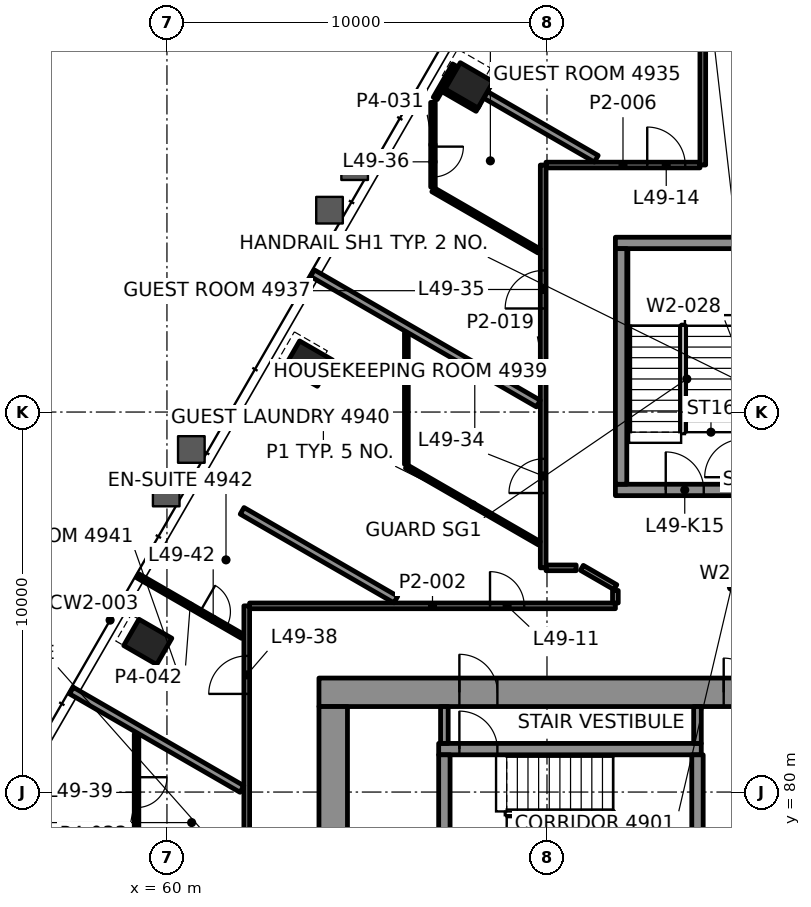
"""IFC4 building model, lengths in metres.
Left out: names, types, materials, properties, quantities, classifications, styles, units other than length and angle.
Written with IfcOpenShell. Run it as: python <this file> out.ifc"""

import sys

from ifc_helpers import new_model, si_unit, direction, frame, frame_2d, origin, origin_2d, place, context, subcontext, project, spatial, rectangle, hollow_rectangle, extrude, element, fill, save


model = new_model("IFC4")
c1 = context("Model", 3, precision=1e-05, world=origin(), true_north=direction((0.0, 1.0)))
c2 = subcontext(c1, "Body", "Model", "MODEL_VIEW")
j1 = project(units=[si_unit("LENGTHUNIT", "METRE"), si_unit("PLANEANGLEUNIT", "RADIAN")], contexts=[c1])
p1 = place(None, origin())
s1 = spatial("IfcSite", under=j1, at=p1, CompositionType="ELEMENT")
p2 = place(p1, origin())
s2 = spatial("IfcBuilding", under=s1, at=p2, CompositionType="ELEMENT")
p3 = place(p2, frame((0.0, 0.0, 210.4)))
s3 = spatial("IfcBuildingStorey", under=s2, at=p3, CompositionType="ELEMENT", Elevation=210.4)
for number, where, z_axis, x_axis in (
    (1, (67.952, 98.597, -0.0), (0.0, 0.0, 1.0), (-0.5, -0.866, 0.0)),
    (2, (63.724, 91.274, -0.0), (0.0, 0.0, 1.0), (-0.5, -0.866, 0.0)),
    (3, (59.496, 83.951, -0.0), (0.0, 0.0, 1.0), (-0.5, -0.866, 0.0)),
):
    element("IfcColumn", number, at=place(p3, frame(where, z_axis=z_axis, x_axis=x_axis)), inside=s3, PredefinedType="COLUMN", context=c2, shape_type="SweptSolid", body=[
        extrude(hollow_rectangle(XDim=0.8, YDim=1.0, WallThickness=0.05, at=origin_2d()), origin(), (0.0, 0.0, 1.0), 3.9),
    ])
p4 = place(p3, frame((64.0, 82.625, 0.0), z_axis=(0.0, 0.0, 1.0), x_axis=(1.0, 0.0, 0.0)))
e4 = element("IfcWall", 4, at=p4, inside=s3, PredefinedType="SHEAR", context=c2, shape_type="SweptSolid", body=[
    extrude(rectangle(XDim=22.0, YDim=0.75, at=frame_2d((11.0, 0.0))), origin(), (0.0, 0.0, 1.0), 3.7),
])
p5 = place(p4, frame((3.695, 0.0, 0.0)))
e5 = element("IfcOpeningElement", 5, at=p5, cuts=e4, PredefinedType="OPENING", context=c2, shape_type="SweptSolid", body=[
    extrude(rectangle(XDim=1.0, YDim=2.1, at=frame_2d((0.5, 1.05))), frame((0.0, 0.385, 0.0), z_axis=(0.0, -1.0, 0.0), x_axis=(1.0, 0.0, 0.0)), (0.0, 0.0, 1.0), 0.77),
])
p6 = place(p4, frame((17.505, 0.0, 0.0)))
e6 = element("IfcOpeningElement", 6, at=p6, cuts=e4, PredefinedType="OPENING", context=c2, shape_type="SweptSolid", body=[
    extrude(rectangle(XDim=1.0, YDim=2.1, at=frame_2d((0.5, 1.05))), frame((0.0, 0.385, 0.0), z_axis=(0.0, -1.0, 0.0), x_axis=(1.0, 0.0, 0.0)), (0.0, 0.0, 1.0), 0.77),
])
p7 = place(p4, frame((10.65, 0.0, 0.0)))
e7 = element("IfcOpeningElement", 7, at=p7, cuts=e4, PredefinedType="OPENING", context=c2, shape_type="SweptSolid", body=[
    extrude(rectangle(XDim=0.9, YDim=2.1, at=frame_2d((0.45, 1.05))), frame((0.0, 0.385, 0.0), z_axis=(0.0, -1.0, 0.0), x_axis=(1.0, 0.0, 0.0)), (0.0, 0.0, 1.0), 0.77),
])
p8 = place(p3, frame((64.375, 67.75, 0.0), z_axis=(0.0, 0.0, 1.0), x_axis=(0.0, 1.0, 0.0)))
e8 = element("IfcWall", 8, at=p8, inside=s3, PredefinedType="SHEAR", context=c2, shape_type="SweptSolid", body=[
    extrude(rectangle(XDim=14.5, YDim=0.75, at=frame_2d((7.25, 0.0))), origin(), (0.0, 0.0, 1.0), 3.7),
])
p9 = place(p8, frame((4.65, 0.0, 0.0)))
e9 = element("IfcOpeningElement", 9, at=p9, cuts=e8, PredefinedType="OPENING", context=c2, shape_type="SweptSolid", body=[
    extrude(rectangle(XDim=1.8, YDim=2.1, at=frame_2d((0.9, 1.05))), frame((0.0, 0.385, 0.0), z_axis=(0.0, -1.0, 0.0), x_axis=(1.0, 0.0, 0.0)), (0.0, 0.0, 1.0), 0.77),
])
p10 = place(p8, frame((2.55, 0.0, 0.0)))
e10 = element("IfcOpeningElement", 10, at=p10, cuts=e8, PredefinedType="OPENING", context=c2, shape_type="SweptSolid", body=[
    extrude(rectangle(XDim=0.9, YDim=2.1, at=frame_2d((0.45, 1.05))), frame((0.0, 0.385, 0.0), z_axis=(0.0, -1.0, 0.0), x_axis=(1.0, 0.0, 0.0)), (0.0, 0.0, 1.0), 0.77),
])
p11 = place(p8, frame((10.35, 0.0, 0.0)))
e11 = element("IfcOpeningElement", 11, at=p11, cuts=e8, PredefinedType="OPENING", context=c2, shape_type="SweptSolid", body=[
    extrude(rectangle(XDim=0.9, YDim=2.1, at=frame_2d((0.45, 1.05))), frame((0.0, 0.385, 0.0), z_axis=(0.0, -1.0, 0.0), x_axis=(1.0, 0.0, 0.0)), (0.0, 0.0, 1.0), 0.77),
])
p12 = place(p3, frame((67.15, 81.13, 0.0), z_axis=(0.0, 0.0, 1.0), x_axis=(1.0, 0.0, 0.0)))
e12 = element("IfcWall", 12, at=p12, inside=s3, PredefinedType="SHEAR", context=c2, shape_type="SweptSolid", body=[
    extrude(rectangle(XDim=6.91, YDim=0.3, at=frame_2d((3.455, 0.0))), origin(), (0.0, 0.0, 1.0), 3.7),
])
p13 = place(p12, frame((0.545, 0.0, 0.0)))
e13 = element("IfcOpeningElement", 13, at=p13, cuts=e12, PredefinedType="OPENING", context=c2, shape_type="SweptSolid", body=[
    extrude(rectangle(XDim=1.0, YDim=2.1, at=frame_2d((0.5, 1.05))), frame((0.0, 0.16, 0.0), z_axis=(0.0, -1.0, 0.0), x_axis=(1.0, 0.0, 0.0)), (0.0, 0.0, 1.0), 0.32),
])
for number, where, z_axis, x_axis in (
    (14, (67.3, 77.9, 0.0), (0.0, 0.0, 1.0), (0.0, 1.0, 0.0)),
    (15, (73.96, 77.9, 0.0), (0.0, 0.0, 1.0), (0.0, 1.0, 0.0)),
):
    element("IfcWall", number, at=place(p3, frame(where, z_axis=z_axis, x_axis=x_axis)), inside=s3, PredefinedType="SHEAR", context=c2, shape_type="SweptSolid", body=[
        extrude(rectangle(XDim=3.08, YDim=0.3, at=frame_2d((1.54, 0.0))), origin(), (0.0, 0.0, 1.0), 3.7),
    ])
p14 = place(p3, frame((71.8, 87.95, 0.0), z_axis=(0.0, 0.0, 1.0), x_axis=(1.0, 0.0, 0.0)))
e16 = element("IfcWall", 16, at=p14, inside=s3, PredefinedType="SHEAR", context=c2, shape_type="SweptSolid", body=[
    extrude(rectangle(XDim=6.4, YDim=0.3, at=frame_2d((3.2, 0.0))), origin(), (0.0, 0.0, 1.0), 3.7),
])
p15 = place(p14, frame((1.325, 0.0, 0.0)))
e17 = element("IfcOpeningElement", 17, at=p15, cuts=e16, PredefinedType="OPENING", context=c2, shape_type="SweptSolid", body=[
    extrude(rectangle(XDim=1.0, YDim=2.1, at=frame_2d((0.5, 1.05))), frame((0.0, 0.16, 0.0), z_axis=(0.0, -1.0, 0.0), x_axis=(1.0, 0.0, 0.0)), (0.0, 0.0, 1.0), 0.32),
])
p16 = place(p14, frame((4.125, 0.0, 0.0)))
e18 = element("IfcOpeningElement", 18, at=p16, cuts=e16, PredefinedType="OPENING", context=c2, shape_type="SweptSolid", body=[
    extrude(rectangle(XDim=1.2, YDim=2.1, at=frame_2d((0.6, 1.05))), frame((0.0, 0.16, 0.0), z_axis=(0.0, -1.0, 0.0), x_axis=(1.0, 0.0, 0.0)), (0.0, 0.0, 1.0), 0.32),
])
p17 = place(p3, frame((71.8, 94.45, 0.0), z_axis=(0.0, 0.0, 1.0), x_axis=(1.0, 0.0, 0.0)))
e19 = element("IfcWall", 19, at=p17, inside=s3, PredefinedType="SHEAR", context=c2, shape_type="SweptSolid", body=[
    extrude(rectangle(XDim=6.4, YDim=0.3, at=frame_2d((3.2, 0.0))), origin(), (0.0, 0.0, 1.0), 3.7),
])
p18 = place(p3, frame((71.95, 88.1, 0.0), z_axis=(0.0, 0.0, 1.0), x_axis=(0.0, 1.0, 0.0)))
e20 = element("IfcWall", 20, at=p18, inside=s3, PredefinedType="SHEAR", context=c2, shape_type="SweptSolid", body=[
    extrude(rectangle(XDim=6.2, YDim=0.3, at=frame_2d((3.1, 0.0))), origin(), (0.0, 0.0, 1.0), 3.7),
])
p19 = place(p3, frame((62.175, 84.9, 0.0), z_axis=(0.0, 0.0, 1.0), x_axis=(1.0, 0.0, 0.0)))
e21 = element("IfcWall", 21, at=p19, inside=s3, PredefinedType="PARTITIONING", context=c2, shape_type="SweptSolid", body=[
    extrude(rectangle(XDim=9.625, YDim=0.15, at=frame_2d((4.812, 0.0))), origin(), (0.0, 0.0, 1.0), 3.097),
])
p20 = place(p19, frame((6.326, 0.0, 0.0)))
e22 = element("IfcOpeningElement", 22, at=p20, cuts=e21, PredefinedType="OPENING", context=c2, shape_type="SweptSolid", body=[
    extrude(rectangle(XDim=0.9, YDim=2.1, at=frame_2d((0.45, 1.05))), frame((0.0, 0.085, 0.0), z_axis=(0.0, -1.0, 0.0), x_axis=(1.0, 0.0, 0.0)), (0.0, 0.0, 1.0), 0.17),
])
p21 = place(p3, frame((69.976, 85.9, 0.0), z_axis=(0.0, 0.0, 1.0), x_axis=(1.0, 0.0, 0.0)))
e23 = element("IfcWall", 23, at=p21, inside=s3, PredefinedType="PARTITIONING", context=c2, shape_type="SweptSolid", body=[
    extrude(rectangle(XDim=0.792, YDim=0.15, at=frame_2d((0.396, 0.0))), origin(), (0.0, 0.0, 1.0), 3.097),
])
p22 = place(p3, frame((69.975, 96.5, 0.0), z_axis=(0.0, 0.0, 1.0), x_axis=(1.0, 0.0, 0.0)))
e24 = element("IfcWall", 24, at=p22, inside=s3, PredefinedType="PARTITIONING", context=c2, shape_type="SweptSolid", body=[
    extrude(rectangle(XDim=4.05, YDim=0.15, at=frame_2d((2.025, 0.0))), origin(), (0.0, 0.0, 1.0), 3.1),
])
p23 = place(p22, frame((2.663, 0.0, 0.0)))
e25 = element("IfcOpeningElement", 25, at=p23, cuts=e24, PredefinedType="OPENING", context=c2, shape_type="SweptSolid", body=[
    extrude(rectangle(XDim=1.0, YDim=2.1, at=frame_2d((0.5, 1.05))), frame((0.0, 0.085, 0.0), z_axis=(0.0, -1.0, 0.0), x_axis=(1.0, 0.0, 0.0)), (0.0, 0.0, 1.0), 0.17),
])
p24 = place(p3, frame((67.06, 98.253, 0.0), z_axis=(0.0, 0.0, 1.0), x_axis=(0.499972622635, 0.866041209536, 0.0)))
e26 = element("IfcWall", 26, at=p24, inside=s3, PredefinedType="PARTITIONING", context=c2, shape_type="SweptSolid", body=[
    extrude(rectangle(XDim=1.014, YDim=0.12, at=frame_2d((0.507, 0.0))), origin(), (0.0, 0.0, 1.0), 3.1),
])
p25 = place(p3, frame((74.1, 96.5, 0.0), z_axis=(0.0, 0.0, 1.0), x_axis=(0.0, 1.0, 0.0)))
e27 = element("IfcWall", 27, at=p25, inside=s3, PredefinedType="PARTITIONING", context=c2, shape_type="SweptSolid", body=[
    extrude(rectangle(XDim=6.67, YDim=0.15, at=frame_2d((3.335, 0.0))), origin(), (0.0, 0.0, 1.0), 3.1),
])
p26 = place(p3, frame((71.8, 84.975, 0.0), z_axis=(0.0, 0.0, 1.0), x_axis=(0.0, 1.0, 0.0)))
e28 = element("IfcWall", 28, at=p26, inside=s3, PredefinedType="PARTITIONING", context=c2, shape_type="SweptSolid", body=[
    extrude(rectangle(XDim=0.329, YDim=0.15, at=frame_2d((0.165, 0.0))), origin(), (0.0, 0.0, 1.0), 3.1),
])
p27 = place(p3, frame((69.9, 85.9, 0.0), z_axis=(0.0, 0.0, 1.0), x_axis=(0.0, 1.0, 0.0)))
e29 = element("IfcWall", 29, at=p27, inside=s3, PredefinedType="PARTITIONING", context=c2, shape_type="SweptSolid", body=[
    extrude(rectangle(XDim=10.6, YDim=0.15, at=frame_2d((5.3, 0.0))), origin(), (0.0, 0.0, 1.0), 3.097),
])
p28 = place(p27, frame((1.968, 0.0, 0.0)))
e30 = element("IfcOpeningElement", 30, at=p28, cuts=e29, PredefinedType="OPENING", context=c2, shape_type="SweptSolid", body=[
    extrude(rectangle(XDim=0.9, YDim=2.1, at=frame_2d((0.45, 1.05))), frame((0.0, 0.085, 0.0), z_axis=(0.0, -1.0, 0.0), x_axis=(1.0, 0.0, 0.0)), (0.0, 0.0, 1.0), 0.17),
])
p29 = place(p27, frame((6.825, 0.0, 0.0)))
e31 = element("IfcOpeningElement", 31, at=p29, cuts=e29, PredefinedType="OPENING", context=c2, shape_type="SweptSolid", body=[
    extrude(rectangle(XDim=1.0, YDim=2.1, at=frame_2d((0.5, 1.05))), frame((0.0, 0.085, 0.0), z_axis=(0.0, -1.0, 0.0), x_axis=(1.0, 0.0, 0.0)), (0.0, 0.0, 1.0), 0.17),
])
p30 = place(p3, frame((67.0, 98.149, 0.0), z_axis=(0.0, 0.0, 1.0), x_axis=(0.0, -1.0, 0.0)))
e32 = element("IfcWall", 32, at=p30, inside=s3, PredefinedType="PARTITIONING", context=c2, shape_type="SweptSolid", body=[
    extrude(rectangle(XDim=2.228, YDim=0.12, at=frame_2d((1.114, 0.0))), origin(), (0.0, 0.0, 1.0), 3.022),
])
p31 = place(p30, frame((1.164, 0.0, 0.0)))
e33 = element("IfcOpeningElement", 33, at=p31, cuts=e32, PredefinedType="OPENING", context=c2, shape_type="SweptSolid", body=[
    extrude(rectangle(XDim=0.8, YDim=2.1, at=frame_2d((0.4, 1.05))), frame((0.0, 0.07, 0.0), z_axis=(0.0, -1.0, 0.0), x_axis=(1.0, 0.0, 0.0)), (0.0, 0.0, 1.0), 0.14),
])
p32 = place(p3, frame((66.3, 88.624, 0.0), z_axis=(0.0, 0.0, 1.0), x_axis=(0.0, 1.0, 0.0)))
e34 = element("IfcWall", 34, at=p32, inside=s3, PredefinedType="PARTITIONING", context=c2, shape_type="SweptSolid", body=[
    extrude(rectangle(XDim=3.458, YDim=0.1, at=frame_2d((1.729, 0.0))), origin(), (0.0, 0.0, 1.0), 3.1),
])
p33 = place(p3, frame((62.1, 68.591, 0.0), z_axis=(0.0, 0.0, 1.0), x_axis=(0.0, 1.0, 0.0)))
e35 = element("IfcWall", 35, at=p33, inside=s3, PredefinedType="PARTITIONING", context=c2, shape_type="SweptSolid", body=[
    extrude(rectangle(XDim=16.309, YDim=0.15, at=frame_2d((8.154, 0.0))), origin(), (0.0, 0.0, 1.0), 3.1),
])
p34 = place(p33, frame((6.668, 0.0, 0.0)))
e36 = element("IfcOpeningElement", 36, at=p34, cuts=e35, PredefinedType="OPENING", context=c2, shape_type="SweptSolid", body=[
    extrude(rectangle(XDim=1.0, YDim=2.1, at=frame_2d((0.5, 1.05))), frame((0.0, 0.085, 0.0), z_axis=(0.0, -1.0, 0.0), x_axis=(1.0, 0.0, 0.0)), (0.0, 0.0, 1.0), 0.17),
])
p35 = place(p33, frame((13.991, 0.0, 0.0)))
e37 = element("IfcOpeningElement", 37, at=p35, cuts=e35, PredefinedType="OPENING", context=c2, shape_type="SweptSolid", body=[
    extrude(rectangle(XDim=1.0, YDim=2.1, at=frame_2d((0.5, 1.05))), frame((0.0, 0.085, 0.0), z_axis=(0.0, -1.0, 0.0), x_axis=(1.0, 0.0, 0.0)), (0.0, 0.0, 1.0), 0.17),
])
p36 = place(p3, frame((59.2, 81.526, 0.0), z_axis=(0.0, 0.0, 1.0), x_axis=(0.0, -1.0, 0.0)))
e38 = element("IfcWall", 38, at=p36, inside=s3, PredefinedType="PARTITIONING", context=c2, shape_type="SweptSolid", body=[
    extrude(rectangle(XDim=3.07, YDim=0.12, at=frame_2d((1.535, 0.0))), origin(), (0.0, 0.0, 1.0), 3.1),
])
p37 = place(p36, frame((1.135, 0.0, 0.0)))
e39 = element("IfcOpeningElement", 39, at=p37, cuts=e38, PredefinedType="OPENING", context=c2, shape_type="SweptSolid", body=[
    extrude(rectangle(XDim=0.8, YDim=2.1, at=frame_2d((0.4, 1.05))), frame((0.0, 0.07, 0.0), z_axis=(0.0, -1.0, 0.0), x_axis=(1.0, 0.0, 0.0)), (0.0, 0.0, 1.0), 0.14),
])
p38 = place(p3, frame((71.298, 96.665, 0.0), z_axis=(0.0, 0.0, 1.0), x_axis=(-0.866023625329, 0.500003080363, 0.0)))
e40 = element("IfcWall", 40, at=p38, inside=s3, PredefinedType="PARTITIONING", context=c2, shape_type="SweptSolid", body=[
    extrude(rectangle(XDim=3.364, YDim=0.2, at=frame_2d((1.682, 0.0))), origin(), (0.0, 0.0, 1.0), 3.1),
])
p39 = place(p3, frame((68.185, 98.0, 0.0), z_axis=(0.0, 0.0, 1.0), x_axis=(-0.866071776036, 0.499919672301, 0.0)))
e41 = element("IfcWall", 41, at=p39, inside=s3, PredefinedType="PARTITIONING", context=c2, shape_type="SweptSolid", body=[
    extrude(rectangle(XDim=1.0, YDim=0.2, at=frame_2d((0.5, 0.0))), origin(), (0.0, 0.0, 1.0), 3.022),
])
p40 = place(p3, frame((69.79, 94.24, 0.0), z_axis=(0.0, 0.0, 1.0), x_axis=(-0.86604299788, 0.499969524894, 0.0)))
e42 = element("IfcWall", 42, at=p40, inside=s3, PredefinedType="PARTITIONING", context=c2, shape_type="SweptSolid", body=[
    extrude(rectangle(XDim=3.222, YDim=0.12, at=frame_2d((1.611, 0.0))), origin(), (0.0, 0.0, 1.0), 3.1),
])
p41 = place(p3, frame((69.773, 90.222, 0.0), z_axis=(0.0, 0.0, 1.0), x_axis=(-0.866032781393, 0.499987221389, 0.0)))
e43 = element("IfcWall", 43, at=p41, inside=s3, PredefinedType="PARTITIONING", context=c2, shape_type="SweptSolid", body=[
    extrude(rectangle(XDim=6.865, YDim=0.2, at=frame_2d((3.432, 0.0))), origin(), (0.0, 0.0, 1.0), 3.022),
])
p42 = place(p3, frame((71.8, 85.391, 0.0), z_axis=(0.0, 0.0, 1.0), x_axis=(-0.866021929094, 0.500006018292, 0.0)))
e44 = element("IfcWall", 44, at=p42, inside=s3, PredefinedType="PARTITIONING", context=c2, shape_type="SweptSolid", body=[
    extrude(rectangle(XDim=1.019, YDim=0.15, at=frame_2d((0.509, 0.0))), origin(), (0.0, 0.0, 1.0), 3.1),
])
p43 = place(p3, frame((69.799, 86.546, 0.0), z_axis=(0.0, 0.0, 1.0), x_axis=(-0.866025579307, 0.499999695987, 0.0)))
e45 = element("IfcWall", 45, at=p43, inside=s3, PredefinedType="PARTITIONING", context=c2, shape_type="SweptSolid", body=[
    extrude(rectangle(XDim=4.04, YDim=0.1, at=frame_2d((2.02, 0.0))), origin(), (0.0, 0.0, 1.0), 3.1),
])
p44 = place(p3, frame((66.023, 85.065, 0.0), z_axis=(0.0, 0.0, 1.0), x_axis=(-0.866034108906, 0.499984921984, 0.0)))
e46 = element("IfcWall", 46, at=p44, inside=s3, PredefinedType="PARTITIONING", context=c2, shape_type="SweptSolid", body=[
    extrude(rectangle(XDim=4.67, YDim=0.2, at=frame_2d((2.335, 0.0))), origin(), (0.0, 0.0, 1.0), 3.1),
])
p45 = place(p3, frame((59.23, 85.691, 0.0), z_axis=(0.0, 0.0, 1.0), x_axis=(0.866042722185, -0.49997000245, 0.0)))
e47 = element("IfcWall", 47, at=p45, inside=s3, PredefinedType="PARTITIONING", context=c2, shape_type="SweptSolid", body=[
    extrude(rectangle(XDim=3.187, YDim=0.12, at=frame_2d((1.594, 0.0))), origin(), (0.0, 0.0, 1.0), 3.022),
])
p46 = place(p45, frame((1.894, 0.0, 0.0)))
e48 = element("IfcOpeningElement", 48, at=p46, cuts=e47, PredefinedType="OPENING", context=c2, shape_type="SweptSolid", body=[
    extrude(rectangle(XDim=0.8, YDim=2.1, at=frame_2d((0.4, 1.05))), frame((0.0, 0.07, 0.0), z_axis=(0.0, -1.0, 0.0), x_axis=(1.0, 0.0, 0.0)), (0.0, 0.0, 1.0), 0.14),
])
p47 = place(p3, frame((61.973, 80.08, 0.0), z_axis=(0.0, 0.0, 1.0), x_axis=(-0.86601608377, 0.500016142392, 0.0)))
e49 = element("IfcWall", 49, at=p47, inside=s3, PredefinedType="PARTITIONING", context=c2, shape_type="SweptSolid", body=[
    extrude(rectangle(XDim=5.181, YDim=0.2, at=frame_2d((2.59, 0.0))), origin(), (0.0, 0.0, 1.0), 3.022),
])
for number, where, z_axis, x_axis in (
    (50, (67.3, 81.28, 0.0), (0.0, 0.0, 1.0), (0.0, 1.0, 0.0)),
    (51, (73.96, 81.28, 0.0), (0.0, 0.0, 1.0), (0.0, 1.0, 0.0)),
):
    element("IfcWall", number, at=place(p3, frame(where, z_axis=z_axis, x_axis=x_axis)), inside=s3, PredefinedType="PARTITIONING", context=c2, shape_type="SweptSolid", body=[
        extrude(rectangle(XDim=0.97, YDim=0.2, at=frame_2d((0.485, 0.0))), origin(), (0.0, 0.0, 1.0), 3.7),
    ])
p48 = place(p20, origin())
e52 = element("IfcDoor", 52, at=p48, inside=s3, OperationType="SINGLE_SWING_LEFT", PredefinedType="DOOR", context=c2, shape_type="SweptSolid", body=[
    extrude(rectangle(XDim=0.9, YDim=2.1, at=frame_2d((0.45, 1.05))), frame((0.0, 0.025, 0.0), z_axis=(0.0, -1.0, 0.0), x_axis=(1.0, 0.0, 0.0)), (0.0, 0.0, 1.0), 0.05),
])
fill(e22, e52)
p49 = place(p23, origin())
e53 = element("IfcDoor", 53, at=p49, inside=s3, OperationType="SINGLE_SWING_RIGHT", PredefinedType="DOOR", context=c2, shape_type="SweptSolid", body=[
    extrude(rectangle(XDim=1.0, YDim=2.1, at=frame_2d((0.5, 1.05))), frame((0.0, 0.025, 0.0), z_axis=(0.0, -1.0, 0.0), x_axis=(1.0, 0.0, 0.0)), (0.0, 0.0, 1.0), 0.05),
])
fill(e25, e53)
p50 = place(p28, origin())
e54 = element("IfcDoor", 54, at=p50, inside=s3, OperationType="SINGLE_SWING_RIGHT", PredefinedType="DOOR", context=c2, shape_type="SweptSolid", body=[
    extrude(rectangle(XDim=0.9, YDim=2.1, at=frame_2d((0.45, 1.05))), frame((0.0, 0.025, 0.0), z_axis=(0.0, -1.0, 0.0), x_axis=(1.0, 0.0, 0.0)), (0.0, 0.0, 1.0), 0.05),
])
fill(e30, e54)
p51 = place(p29, origin())
e55 = element("IfcDoor", 55, at=p51, inside=s3, OperationType="SINGLE_SWING_RIGHT", PredefinedType="DOOR", context=c2, shape_type="SweptSolid", body=[
    extrude(rectangle(XDim=1.0, YDim=2.1, at=frame_2d((0.5, 1.05))), frame((0.0, 0.025, 0.0), z_axis=(0.0, -1.0, 0.0), x_axis=(1.0, 0.0, 0.0)), (0.0, 0.0, 1.0), 0.05),
])
fill(e31, e55)
p52 = place(p31, origin())
e56 = element("IfcDoor", 56, at=p52, inside=s3, OperationType="SINGLE_SWING_RIGHT", PredefinedType="DOOR", context=c2, shape_type="SweptSolid", body=[
    extrude(rectangle(XDim=0.8, YDim=2.1, at=frame_2d((0.4, 1.05))), frame((0.0, 0.025, 0.0), z_axis=(0.0, -1.0, 0.0), x_axis=(1.0, 0.0, 0.0)), (0.0, 0.0, 1.0), 0.05),
])
fill(e33, e56)
p53 = place(p35, origin())
e57 = element("IfcDoor", 57, at=p53, inside=s3, OperationType="SINGLE_SWING_RIGHT", PredefinedType="DOOR", context=c2, shape_type="SweptSolid", body=[
    extrude(rectangle(XDim=1.0, YDim=2.1, at=frame_2d((0.5, 1.05))), frame((0.0, 0.025, 0.0), z_axis=(0.0, -1.0, 0.0), x_axis=(1.0, 0.0, 0.0)), (0.0, 0.0, 1.0), 0.05),
])
fill(e37, e57)
p54 = place(p37, origin())
e58 = element("IfcDoor", 58, at=p54, inside=s3, OperationType="SINGLE_SWING_RIGHT", PredefinedType="DOOR", context=c2, shape_type="SweptSolid", body=[
    extrude(rectangle(XDim=0.8, YDim=2.1, at=frame_2d((0.4, 1.05))), frame((0.0, 0.025, 0.0), z_axis=(0.0, -1.0, 0.0), x_axis=(1.0, 0.0, 0.0)), (0.0, 0.0, 1.0), 0.05),
])
fill(e39, e58)
p55 = place(p46, origin())
e59 = element("IfcDoor", 59, at=p55, inside=s3, OperationType="SINGLE_SWING_RIGHT", PredefinedType="DOOR", context=c2, shape_type="SweptSolid", body=[
    extrude(rectangle(XDim=0.8, YDim=2.1, at=frame_2d((0.4, 1.05))), frame((0.0, 0.025, 0.0), z_axis=(0.0, -1.0, 0.0), x_axis=(1.0, 0.0, 0.0)), (0.0, 0.0, 1.0), 0.05),
])
fill(e48, e59)
p56 = place(p13, origin())
e60 = element("IfcDoor", 60, at=p56, inside=s3, OperationType="SINGLE_SWING_RIGHT", PredefinedType="DOOR", context=c2, shape_type="SweptSolid", body=[
    extrude(rectangle(XDim=1.0, YDim=2.1, at=frame_2d((0.5, 1.05))), frame((0.0, 0.025, 0.0), z_axis=(0.0, -1.0, 0.0), x_axis=(1.0, 0.0, 0.0)), (0.0, 0.0, 1.0), 0.05),
])
fill(e13, e60)
p57 = place(p5, origin())
e61 = element("IfcDoor", 61, at=p57, inside=s3, OperationType="SINGLE_SWING_LEFT", PredefinedType="DOOR", context=c2, shape_type="SweptSolid", body=[
    extrude(rectangle(XDim=1.0, YDim=2.1, at=frame_2d((0.5, 1.05))), frame((0.0, 0.095, 0.0), z_axis=(0.0, -1.0, 0.0), x_axis=(1.0, 0.0, 0.0)), (0.0, 0.0, 1.0), 0.19),
])
fill(e5, e61)
p58 = place(p15, origin())
e62 = element("IfcDoor", 62, at=p58, inside=s3, OperationType="SINGLE_SWING_RIGHT", PredefinedType="DOOR", context=c2, shape_type="SweptSolid", body=[
    extrude(rectangle(XDim=1.0, YDim=2.1, at=frame_2d((0.5, 1.05))), frame((0.0, 0.025, 0.0), z_axis=(0.0, -1.0, 0.0), x_axis=(1.0, 0.0, 0.0)), (0.0, 0.0, 1.0), 0.05),
])
fill(e17, e62)
p59 = place(p7, origin())
e63 = element("IfcDoor", 63, at=p59, inside=s3, OperationType="SINGLE_SWING_LEFT", PredefinedType="DOOR", context=c2, shape_type="SweptSolid", body=[
    extrude(rectangle(XDim=0.9, YDim=2.1, at=frame_2d((0.45, 1.05))), frame((0.0, 0.095, 0.0), z_axis=(0.0, -1.0, 0.0), x_axis=(1.0, 0.0, 0.0)), (0.0, 0.0, 1.0), 0.19),
])
fill(e7, e63)
save(model, sys.argv[1])
